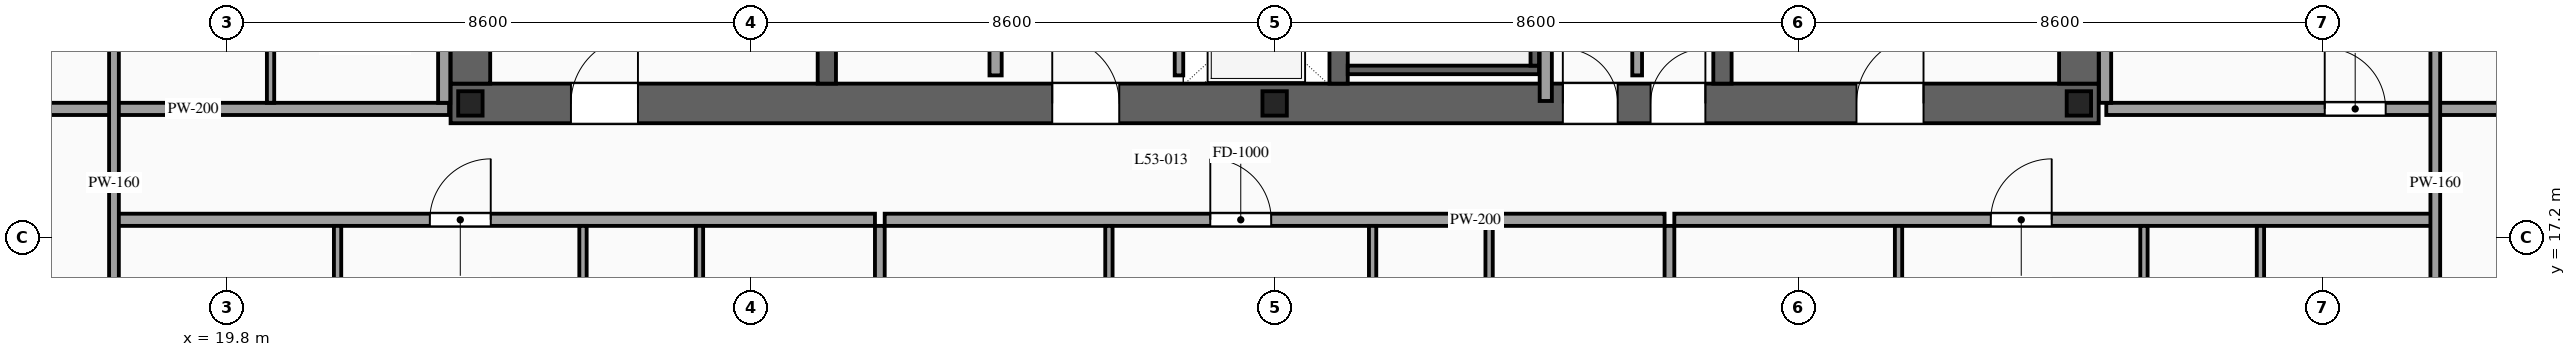
"""IFC4 building model, lengths in metres.
Left out: names, types, materials, properties, quantities, classifications, styles, units other than length and angle.
Written with IfcOpenShell. Run it as: python <this file> out.ifc"""

import sys

from ifc_helpers import new_model, si_unit, direction, frame, frame_2d, origin, origin_2d, place, context, subcontext, project, spatial, rectangle, i_section, extrude, source, transform, mapped, element, fill, save


model = new_model("IFC4")
c1 = context("Model", 3, precision=1e-05, world=origin(), true_north=direction((0.0, 1.0)))
c2 = subcontext(c1, "Body", "Model", "MODEL_VIEW")
j1 = project(units=[si_unit("LENGTHUNIT", "METRE"), si_unit("PLANEANGLEUNIT", "RADIAN")], contexts=[c1])
p1 = place(None, origin())
s1 = spatial("IfcSite", under=j1, at=p1, CompositionType="ELEMENT")
p2 = place(p1, origin())
s2 = spatial("IfcBuilding", under=s1, at=p2, CompositionType="ELEMENT")
p3 = place(p2, frame((0.0, 0.0, 202.0)))
s3 = spatial("IfcBuildingStorey", under=s2, at=p3, CompositionType="ELEMENT", Elevation=202.0)
p4 = place(p3, frame((23.475, 19.4, 0.0), z_axis=(0.0, 0.0, 1.0), x_axis=(1.0, 0.0, 0.0)))
e1 = element("IfcWall", 1, at=p4, inside=s3, PredefinedType="SHEAR", context=c2, shape_type="SweptSolid", body=[
    extrude(rectangle(XDim=27.05, YDim=0.65, at=frame_2d((13.525, 0.0))), origin(), (0.0, 0.0, 1.0), 3.5),
])
p5 = place(p4, frame((1.975, 0.0, 0.0)))
e2 = element("IfcOpeningElement", 2, at=p5, cuts=e1, PredefinedType="OPENING", context=c2, shape_type="SweptSolid", body=[
    extrude(rectangle(XDim=1.1, YDim=2.2, at=frame_2d((0.55, 1.1))), frame((0.0, 0.34, 0.0), z_axis=(0.0, -1.0, 0.0), x_axis=(1.0, 0.0, 0.0)), (0.0, 0.0, 1.0), 0.68),
])
p6 = place(p4, frame((9.875, 0.0, 0.0)))
e3 = element("IfcOpeningElement", 3, at=p6, cuts=e1, PredefinedType="OPENING", context=c2, shape_type="SweptSolid", body=[
    extrude(rectangle(XDim=1.1, YDim=2.2, at=frame_2d((0.55, 1.1))), frame((0.0, 0.34, 0.0), z_axis=(0.0, -1.0, 0.0), x_axis=(1.0, 0.0, 0.0)), (0.0, 0.0, 1.0), 0.68),
])
p7 = place(p4, frame((23.075, 0.0, 0.0)))
e4 = element("IfcOpeningElement", 4, at=p7, cuts=e1, PredefinedType="OPENING", context=c2, shape_type="SweptSolid", body=[
    extrude(rectangle(XDim=1.1, YDim=2.2, at=frame_2d((0.55, 1.1))), frame((0.0, 0.34, 0.0), z_axis=(0.0, -1.0, 0.0), x_axis=(1.0, 0.0, 0.0)), (0.0, 0.0, 1.0), 0.68),
])
p8 = place(p4, frame((19.695, 0.0, 0.0)))
e5 = element("IfcOpeningElement", 5, at=p8, cuts=e1, PredefinedType="OPENING", context=c2, shape_type="SweptSolid", body=[
    extrude(rectangle(XDim=0.9, YDim=2.15, at=frame_2d((0.45, 1.075))), frame((0.0, 0.34, 0.0), z_axis=(0.0, -1.0, 0.0), x_axis=(1.0, 0.0, 0.0)), (0.0, 0.0, 1.0), 0.68),
])
p9 = place(p4, frame((18.255, 0.0, 0.0)))
e6 = element("IfcOpeningElement", 6, at=p9, cuts=e1, PredefinedType="OPENING", context=c2, shape_type="SweptSolid", body=[
    extrude(rectangle(XDim=0.9, YDim=2.15, at=frame_2d((0.45, 1.075))), frame((0.0, 0.34, 0.0), z_axis=(0.0, -1.0, 0.0), x_axis=(1.0, 0.0, 0.0)), (0.0, 0.0, 1.0), 0.68),
])
m1 = source(origin(), c2, "Body", "SweptSolid", [
    extrude(rectangle(XDim=12.15, YDim=0.65, at=frame_2d((6.075, 0.0))), origin(), (0.0, 0.0, 1.0), 3.5),
])
for number, where, z_axis, x_axis in (
    (7, (23.8, 19.725, 0.0), (0.0, 0.0, 1.0), (0.0, 1.0, 0.0)),
    (8, (50.2, 19.725, 0.0), (0.0, 0.0, 1.0), (0.0, 1.0, 0.0)),
):
    element("IfcWall", number, at=place(p3, frame(where, z_axis=z_axis, x_axis=x_axis)), inside=s3, PredefinedType="SHEAR", context=c2, shape_type="MappedRepresentation", body=[
        mapped(m1, transform((0.0, 0.0, 0.0), scale=1.0)),
    ])
m2 = source(origin(), c2, "Body", "SweptSolid", [
    extrude(rectangle(XDim=12.15, YDim=0.3, at=frame_2d((6.075, 0.0))), origin(), (0.0, 0.0, 1.0), 3.5),
])
for number, where, z_axis, x_axis in (
    (9, (29.65, 19.725, 0.0), (0.0, 0.0, 1.0), (0.0, 1.0, 0.0)),
    (10, (38.05, 19.725, 0.0), (0.0, 0.0, 1.0), (0.0, 1.0, 0.0)),
    (11, (44.35, 19.725, 0.0), (0.0, 0.0, 1.0), (0.0, 1.0, 0.0)),
):
    element("IfcWall", number, at=place(p3, frame(where, z_axis=z_axis, x_axis=x_axis)), inside=s3, PredefinedType="SOLIDWALL", context=c2, shape_type="MappedRepresentation", body=[
        mapped(m2, transform((0.0, 0.0, 0.0), scale=1.0)),
    ])
m3 = source(origin(), c2, "Body", "SweptSolid", [
    extrude(i_section(OverallWidth=0.4, OverallDepth=0.4, WebThickness=0.013, FlangeThickness=0.021, at=origin_2d()), origin(), (0.0, 0.0, 1.0), 3.5),
])
for number, where, z_axis, x_axis in (
    (12, (23.8, 19.4, 0.0), (0.0, 0.0, 1.0), (1.0, 0.0, 0.0)),
    (13, (37.0, 19.4, 0.0), (0.0, 0.0, 1.0), (1.0, 0.0, 0.0)),
    (14, (50.2, 19.4, 0.0), (0.0, 0.0, 1.0), (1.0, 0.0, 0.0)),
):
    element("IfcColumn", number, at=place(p3, frame(where, z_axis=z_axis, x_axis=x_axis)), inside=s3, PredefinedType="COLUMN", context=c2, shape_type="MappedRepresentation", body=[
        mapped(m3, transform((0.0, 0.0, 0.0), scale=1.0)),
    ])
p10 = place(p3, frame((35.43, 19.86, 0.0), z_axis=(0.0, 0.0, 1.0), x_axis=(0.0, 1.0, 0.0)))
e15 = element("IfcWall", 15, at=p10, inside=s3, PredefinedType="SOLIDWALL", context=c2, shape_type="SweptSolid", body=[
    extrude(rectangle(XDim=2.04, YDim=0.14, at=frame_2d((1.02, 0.0))), origin(), (0.0, 0.0, 1.0), 3.28),
])
p11 = place(p10, frame((0.47, 0.0, 0.0)))
e16 = element("IfcOpeningElement", 16, at=p11, cuts=e15, PredefinedType="OPENING", context=c2, shape_type="SweptSolid", body=[
    extrude(rectangle(XDim=1.1, YDim=2.2, at=frame_2d((0.55, 1.1))), frame((0.0, 0.085, 0.0), z_axis=(0.0, -1.0, 0.0), x_axis=(1.0, 0.0, 0.0)), (0.0, 0.0, 1.0), 0.17),
])
m4 = source(origin(), c2, "Body", "SweptSolid", [
    extrude(rectangle(XDim=3.14, YDim=0.14, at=frame_2d((1.57, 0.0))), origin(), (0.0, 0.0, 1.0), 3.28),
])
p12 = place(p3, frame((38.2, 19.95, 0.0), z_axis=(0.0, 0.0, 1.0), x_axis=(1.0, 0.0, 0.0)))
e17 = element("IfcWall", 17, at=p12, inside=s3, PredefinedType="SOLIDWALL", context=c2, shape_type="MappedRepresentation", body=[
    mapped(m4, transform((0.0, 0.0, 0.0), scale=1.0)),
])
m5 = source(origin(), c2, "Body", "SweptSolid", [
    extrude(rectangle(XDim=8.94, YDim=0.14, at=frame_2d((4.47, 0.0))), origin(), (0.0, 0.0, 1.0), 3.28),
])
p13 = place(p3, frame((41.27, 20.02, 0.0), z_axis=(0.0, 0.0, 1.0), x_axis=(0.0, 1.0, 0.0)))
e18 = element("IfcWall", 18, at=p13, inside=s3, PredefinedType="SOLIDWALL", context=c2, shape_type="MappedRepresentation", body=[
    mapped(m5, transform((0.0, 0.0, 0.0), scale=1.0)),
])
p14 = place(p3, frame((32.42, 19.86, 0.0), z_axis=(0.0, 0.0, 1.0), x_axis=(0.0, 1.0, 0.0)))
e19 = element("IfcWall", 19, at=p14, inside=s3, PredefinedType="PARTITIONING", context=c2, shape_type="SweptSolid", body=[
    extrude(rectangle(XDim=11.88, YDim=0.2, at=frame_2d((5.94, 0.0))), origin(), (0.0, 0.0, 1.0), 3.28),
])
p15 = place(p14, frame((5.49, 0.0, 0.0)))
e20 = element("IfcOpeningElement", 20, at=p15, cuts=e19, PredefinedType="OPENING", context=c2, shape_type="SweptSolid", body=[
    extrude(rectangle(XDim=0.9, YDim=2.15, at=frame_2d((0.45, 1.075))), frame((0.0, 0.115, 0.0), z_axis=(0.0, -1.0, 0.0), x_axis=(1.0, 0.0, 0.0)), (0.0, 0.0, 1.0), 0.23),
])
m6 = source(origin(), c2, "Body", "SweptSolid", [
    extrude(rectangle(XDim=1.34, YDim=0.16, at=frame_2d((0.67, 0.0))), origin(), (0.0, 0.0, 1.0), 3.28),
])
p16 = place(p3, frame((42.95, 19.86, 0.0), z_axis=(0.0, 0.0, 1.0), x_axis=(0.0, 1.0, 0.0)))
e21 = element("IfcWall", 21, at=p16, inside=s3, PredefinedType="PARTITIONING", context=c2, shape_type="MappedRepresentation", body=[
    mapped(m6, transform((0.0, 0.0, 0.0), scale=1.0)),
])
m7 = source(origin(), c2, "Body", "SweptSolid", [
    extrude(rectangle(XDim=12.72, YDim=0.2, at=frame_2d((6.36, 0.0))), origin(), (0.0, 0.0, 1.0), 3.28),
])
p17 = place(p3, frame((41.45, 19.44, 0.0), z_axis=(0.0, 0.0, 1.0), x_axis=(0.0, 1.0, 0.0)))
e22 = element("IfcWall", 22, at=p17, inside=s3, PredefinedType="PARTITIONING", context=c2, shape_type="MappedRepresentation", body=[
    mapped(m7, transform((0.0, 0.0, 0.0), scale=1.0)),
])
p18 = place(p3, frame((17.94, 17.49, 0.0), z_axis=(0.0, 0.0, 1.0), x_axis=(1.0, 0.0, 0.0)))
e23 = element("IfcWall", 23, at=p18, inside=s3, PredefinedType="PARTITIONING", context=c2, shape_type="SweptSolid", body=[
    extrude(rectangle(XDim=12.5, YDim=0.2, at=frame_2d((6.25, 0.0))), origin(), (0.0, 0.0, 1.0), 3.28),
])
p19 = place(p18, frame((5.194, 0.0, 0.0)))
e24 = element("IfcOpeningElement", 24, at=p19, cuts=e23, PredefinedType="OPENING", context=c2, shape_type="SweptSolid", body=[
    extrude(rectangle(XDim=1.0, YDim=2.2, at=frame_2d((0.5, 1.1))), frame((0.0, 0.115, 0.0), z_axis=(0.0, -1.0, 0.0), x_axis=(1.0, 0.0, 0.0)), (0.0, 0.0, 1.0), 0.23),
])
m8 = source(origin(), c2, "Body", "SweptSolid", [
    extrude(rectangle(XDim=13.54, YDim=0.16, at=frame_2d((6.77, 0.0))), origin(), (0.0, 0.0, 1.0), 3.28),
])
p20 = place(p3, frame((30.52, 3.85, 0.0), z_axis=(0.0, 0.0, 1.0), x_axis=(0.0, 1.0, 0.0)))
e25 = element("IfcWall", 25, at=p20, inside=s3, PredefinedType="PARTITIONING", context=c2, shape_type="MappedRepresentation", body=[
    mapped(m8, transform((0.0, 0.0, 0.0), scale=1.0)),
])
m9 = source(origin(), c2, "Body", "SweptSolid", [
    extrude(rectangle(XDim=5.61, YDim=0.12, at=frame_2d((2.805, 0.0))), origin(), (0.0, 0.0, 1.0), 3.28),
])
p21 = place(p3, frame((21.62, 11.78, 0.0), z_axis=(0.0, 0.0, 1.0), x_axis=(0.0, 1.0, 0.0)))
e26 = element("IfcWall", 26, at=p21, inside=s3, PredefinedType="PARTITIONING", context=c2, shape_type="MappedRepresentation", body=[
    mapped(m9, transform((0.0, 0.0, 0.0), scale=1.0)),
])
p22 = place(p3, frame((27.56, 11.78, 0.0), z_axis=(0.0, 0.0, 1.0), x_axis=(0.0, 1.0, 0.0)))
e27 = element("IfcWall", 27, at=p22, inside=s3, PredefinedType="PARTITIONING", context=c2, shape_type="SweptSolid", body=[
    extrude(rectangle(XDim=5.61, YDim=0.12, at=frame_2d((2.805, 0.0))), origin(), (0.0, 0.0, 1.0), 3.28),
])
p23 = place(p22, frame((2.38, 0.0, 0.0)))
e28 = element("IfcOpeningElement", 28, at=p23, cuts=e27, PredefinedType="OPENING", context=c2, shape_type="SweptSolid", body=[
    extrude(rectangle(XDim=0.85, YDim=2.1, at=frame_2d((0.425, 1.05))), frame((0.0, 0.075, 0.0), z_axis=(0.0, -1.0, 0.0), x_axis=(1.0, 0.0, 0.0)), (0.0, 0.0, 1.0), 0.15),
])
p24 = place(p3, frame((25.648, 11.78, 0.0), z_axis=(0.0, 0.0, 1.0), x_axis=(0.0, 1.0, 0.0)))
e29 = element("IfcWall", 29, at=p24, inside=s3, PredefinedType="PARTITIONING", context=c2, shape_type="SweptSolid", body=[
    extrude(rectangle(XDim=5.61, YDim=0.12, at=frame_2d((2.805, 0.0))), origin(), (0.0, 0.0, 1.0), 3.28),
])
p25 = place(p24, frame((2.38, 0.0, 0.0)))
e30 = element("IfcOpeningElement", 30, at=p25, cuts=e29, PredefinedType="OPENING", context=c2, shape_type="SweptSolid", body=[
    extrude(rectangle(XDim=0.85, YDim=2.1, at=frame_2d((0.425, 1.05))), frame((0.0, 0.075, 0.0), z_axis=(0.0, -1.0, 0.0), x_axis=(1.0, 0.0, 0.0)), (0.0, 0.0, 1.0), 0.15),
])
p26 = place(p3, frame((30.6, 17.49, 0.0), z_axis=(0.0, 0.0, 1.0), x_axis=(1.0, 0.0, 0.0)))
e31 = element("IfcWall", 31, at=p26, inside=s3, PredefinedType="PARTITIONING", context=c2, shape_type="SweptSolid", body=[
    extrude(rectangle(XDim=12.8, YDim=0.2, at=frame_2d((6.4, 0.0))), origin(), (0.0, 0.0, 1.0), 3.28),
])
p27 = place(p26, frame((5.344, 0.0, 0.0)))
e32 = element("IfcOpeningElement", 32, at=p27, cuts=e31, PredefinedType="OPENING", context=c2, shape_type="SweptSolid", body=[
    extrude(rectangle(XDim=1.0, YDim=2.2, at=frame_2d((0.5, 1.1))), frame((0.0, 0.115, 0.0), z_axis=(0.0, -1.0, 0.0), x_axis=(1.0, 0.0, 0.0)), (0.0, 0.0, 1.0), 0.23),
])
p28 = place(p3, frame((43.48, 3.85, 0.0), z_axis=(0.0, 0.0, 1.0), x_axis=(0.0, 1.0, 0.0)))
e33 = element("IfcWall", 33, at=p28, inside=s3, PredefinedType="PARTITIONING", context=c2, shape_type="MappedRepresentation", body=[
    mapped(m8, transform((0.0, 0.0, 0.0), scale=1.0)),
])
p29 = place(p3, frame((34.28, 11.78, 0.0), z_axis=(0.0, 0.0, 1.0), x_axis=(0.0, 1.0, 0.0)))
e34 = element("IfcWall", 34, at=p29, inside=s3, PredefinedType="PARTITIONING", context=c2, shape_type="MappedRepresentation", body=[
    mapped(m9, transform((0.0, 0.0, 0.0), scale=1.0)),
])
p30 = place(p3, frame((40.52, 11.78, 0.0), z_axis=(0.0, 0.0, 1.0), x_axis=(0.0, 1.0, 0.0)))
e35 = element("IfcWall", 35, at=p30, inside=s3, PredefinedType="PARTITIONING", context=c2, shape_type="SweptSolid", body=[
    extrude(rectangle(XDim=5.61, YDim=0.12, at=frame_2d((2.805, 0.0))), origin(), (0.0, 0.0, 1.0), 3.28),
])
p31 = place(p30, frame((2.38, 0.0, 0.0)))
e36 = element("IfcOpeningElement", 36, at=p31, cuts=e35, PredefinedType="OPENING", context=c2, shape_type="SweptSolid", body=[
    extrude(rectangle(XDim=0.85, YDim=2.1, at=frame_2d((0.425, 1.05))), frame((0.0, 0.075, 0.0), z_axis=(0.0, -1.0, 0.0), x_axis=(1.0, 0.0, 0.0)), (0.0, 0.0, 1.0), 0.15),
])
p32 = place(p3, frame((38.608, 11.78, 0.0), z_axis=(0.0, 0.0, 1.0), x_axis=(0.0, 1.0, 0.0)))
e37 = element("IfcWall", 37, at=p32, inside=s3, PredefinedType="PARTITIONING", context=c2, shape_type="SweptSolid", body=[
    extrude(rectangle(XDim=5.61, YDim=0.12, at=frame_2d((2.805, 0.0))), origin(), (0.0, 0.0, 1.0), 3.28),
])
p33 = place(p32, frame((2.38, 0.0, 0.0)))
e38 = element("IfcOpeningElement", 38, at=p33, cuts=e37, PredefinedType="OPENING", context=c2, shape_type="SweptSolid", body=[
    extrude(rectangle(XDim=0.85, YDim=2.1, at=frame_2d((0.425, 1.05))), frame((0.0, 0.075, 0.0), z_axis=(0.0, -1.0, 0.0), x_axis=(1.0, 0.0, 0.0)), (0.0, 0.0, 1.0), 0.15),
])
p34 = place(p3, frame((43.56, 17.49, 0.0), z_axis=(0.0, 0.0, 1.0), x_axis=(1.0, 0.0, 0.0)))
e39 = element("IfcWall", 39, at=p34, inside=s3, PredefinedType="PARTITIONING", context=c2, shape_type="SweptSolid", body=[
    extrude(rectangle(XDim=12.5, YDim=0.2, at=frame_2d((6.25, 0.0))), origin(), (0.0, 0.0, 1.0), 3.28),
])
p35 = place(p34, frame((5.194, 0.0, 0.0)))
e40 = element("IfcOpeningElement", 40, at=p35, cuts=e39, PredefinedType="OPENING", context=c2, shape_type="SweptSolid", body=[
    extrude(rectangle(XDim=1.0, YDim=2.2, at=frame_2d((0.5, 1.1))), frame((0.0, 0.115, 0.0), z_axis=(0.0, -1.0, 0.0), x_axis=(1.0, 0.0, 0.0)), (0.0, 0.0, 1.0), 0.23),
])
p36 = place(p3, frame((47.24, 11.78, 0.0), z_axis=(0.0, 0.0, 1.0), x_axis=(0.0, 1.0, 0.0)))
e41 = element("IfcWall", 41, at=p36, inside=s3, PredefinedType="PARTITIONING", context=c2, shape_type="MappedRepresentation", body=[
    mapped(m9, transform((0.0, 0.0, 0.0), scale=1.0)),
])
p37 = place(p3, frame((53.18, 11.78, 0.0), z_axis=(0.0, 0.0, 1.0), x_axis=(0.0, 1.0, 0.0)))
e42 = element("IfcWall", 42, at=p37, inside=s3, PredefinedType="PARTITIONING", context=c2, shape_type="SweptSolid", body=[
    extrude(rectangle(XDim=5.61, YDim=0.12, at=frame_2d((2.805, 0.0))), origin(), (0.0, 0.0, 1.0), 3.28),
])
p38 = place(p37, frame((2.38, 0.0, 0.0)))
e43 = element("IfcOpeningElement", 43, at=p38, cuts=e42, PredefinedType="OPENING", context=c2, shape_type="SweptSolid", body=[
    extrude(rectangle(XDim=0.85, YDim=2.1, at=frame_2d((0.425, 1.05))), frame((0.0, 0.075, 0.0), z_axis=(0.0, -1.0, 0.0), x_axis=(1.0, 0.0, 0.0)), (0.0, 0.0, 1.0), 0.15),
])
p39 = place(p3, frame((51.268, 11.78, 0.0), z_axis=(0.0, 0.0, 1.0), x_axis=(0.0, 1.0, 0.0)))
e44 = element("IfcWall", 44, at=p39, inside=s3, PredefinedType="PARTITIONING", context=c2, shape_type="SweptSolid", body=[
    extrude(rectangle(XDim=5.61, YDim=0.12, at=frame_2d((2.805, 0.0))), origin(), (0.0, 0.0, 1.0), 3.28),
])
p40 = place(p39, frame((2.38, 0.0, 0.0)))
e45 = element("IfcOpeningElement", 45, at=p40, cuts=e44, PredefinedType="OPENING", context=c2, shape_type="SweptSolid", body=[
    extrude(rectangle(XDim=0.85, YDim=2.1, at=frame_2d((0.425, 1.05))), frame((0.0, 0.075, 0.0), z_axis=(0.0, -1.0, 0.0), x_axis=(1.0, 0.0, 0.0)), (0.0, 0.0, 1.0), 0.15),
])
m10 = source(origin(), c2, "Body", "SweptSolid", [
    extrude(rectangle(XDim=8.4, YDim=0.2, at=frame_2d((4.2, 0.0))), origin(), (0.0, 0.0, 1.0), 2.775),
])
p41 = place(p3, frame((15.05, 19.31, 0.0), z_axis=(0.0, 0.0, 1.0), x_axis=(1.0, 0.0, 0.0)))
e46 = element("IfcWall", 46, at=p41, inside=s3, PredefinedType="PARTITIONING", context=c2, shape_type="MappedRepresentation", body=[
    mapped(m10, transform((0.0, 0.0, 0.0), scale=1.0)),
])
m11 = source(origin(), c2, "Body", "SweptSolid", [
    extrude(rectangle(XDim=12.78, YDim=0.2, at=frame_2d((6.39, 0.0))), origin(), (0.0, 0.0, 1.0), 3.28),
])
p42 = place(p3, frame((23.37, 19.41, 0.0), z_axis=(0.0, 0.0, 1.0), x_axis=(0.0, 1.0, 0.0)))
e47 = element("IfcWall", 47, at=p42, inside=s3, PredefinedType="PARTITIONING", context=c2, shape_type="MappedRepresentation", body=[
    mapped(m11, transform((0.0, 0.0, 0.0), scale=1.0)),
])
p43 = place(p3, frame((20.52, 19.41, 0.0), z_axis=(0.0, 0.0, 1.0), x_axis=(0.0, 1.0, 0.0)))
e48 = element("IfcWall", 48, at=p43, inside=s3, PredefinedType="PARTITIONING", context=c2, shape_type="SweptSolid", body=[
    extrude(rectangle(XDim=5.623, YDim=0.12, at=frame_2d((2.812, 0.0))), origin(), (0.0, 0.0, 1.0), 3.28),
])
p44 = place(p43, frame((2.386, 0.0, 0.0)))
e49 = element("IfcOpeningElement", 49, at=p44, cuts=e48, PredefinedType="OPENING", context=c2, shape_type="SweptSolid", body=[
    extrude(rectangle(XDim=0.85, YDim=2.1, at=frame_2d((0.425, 1.05))), frame((0.0, 0.075, 0.0), z_axis=(0.0, -1.0, 0.0), x_axis=(1.0, 0.0, 0.0)), (0.0, 0.0, 1.0), 0.15),
])
p45 = place(p3, frame((50.65, 19.31, 0.0), z_axis=(0.0, 0.0, 1.0), x_axis=(1.0, 0.0, 0.0)))
e50 = element("IfcWall", 50, at=p45, inside=s3, PredefinedType="PARTITIONING", context=c2, shape_type="SweptSolid", body=[
    extrude(rectangle(XDim=8.3, YDim=0.2, at=frame_2d((4.15, 0.0))), origin(), (0.0, 0.0, 1.0), 2.775),
])
p46 = place(p45, frame((3.585, 0.0, 0.0)))
e51 = element("IfcOpeningElement", 51, at=p46, cuts=e50, PredefinedType="OPENING", context=c2, shape_type="SweptSolid", body=[
    extrude(rectangle(XDim=1.0, YDim=2.2, at=frame_2d((0.5, 1.1))), frame((0.0, 0.115, 0.0), z_axis=(0.0, -1.0, 0.0), x_axis=(1.0, 0.0, 0.0)), (0.0, 0.0, 1.0), 0.23),
])
m12 = source(origin(), c2, "Body", "SweptSolid", [
    extrude(rectangle(XDim=6.29, YDim=0.2, at=frame_2d((3.145, 0.0))), origin(), (0.0, 0.0, 1.0), 3.28),
])
p47 = place(p3, frame((50.63, 19.41, 0.0), z_axis=(0.0, 0.0, 1.0), x_axis=(0.0, 1.0, 0.0)))
e52 = element("IfcWall", 52, at=p47, inside=s3, PredefinedType="PARTITIONING", context=c2, shape_type="MappedRepresentation", body=[
    mapped(m12, transform((0.0, 0.0, 0.0), scale=1.0)),
])
m13 = source(origin(), c2, "Body", "SweptSolid", [
    extrude(rectangle(XDim=28.19, YDim=0.16, at=frame_2d((14.095, 0.0))), origin(), (0.0, 0.0, 1.0), 3.28),
])
for number, where, z_axis, x_axis in (
    (53, (17.95, 4.0, 0.0), (0.0, 0.0, 1.0), (0.0, 1.0, 0.0)),
    (54, (56.05, 4.0, 0.0), (0.0, 0.0, 1.0), (0.0, 1.0, 0.0)),
):
    element("IfcWall", number, at=place(p3, frame(where, z_axis=z_axis, x_axis=x_axis)), inside=s3, PredefinedType="PARTITIONING", context=c2, shape_type="MappedRepresentation", body=[
        mapped(m13, transform((0.0, 0.0, 0.0), scale=1.0)),
    ])
m14 = source(origin(), c2, "Body", "SweptSolid", [
    extrude(rectangle(XDim=1.1, YDim=2.2, at=frame_2d((0.55, 1.1))), frame((0.0, 0.025, 0.0), z_axis=(0.0, -1.0, 0.0), x_axis=(1.0, 0.0, 0.0)), (0.0, 0.0, 1.0), 0.05),
])
p48 = place(p5, origin())
e55 = element("IfcDoor", 55, at=p48, inside=s3, OperationType="SINGLE_SWING_RIGHT", PredefinedType="DOOR", context=c2, shape_type="MappedRepresentation", body=[
    mapped(m14, transform((0.0, 0.0, 0.0), scale=1.0)),
])
fill(e2, e55)
p49 = place(p6, origin())
e56 = element("IfcDoor", 56, at=p49, inside=s3, OperationType="SINGLE_SWING_LEFT", PredefinedType="DOOR", context=c2, shape_type="MappedRepresentation", body=[
    mapped(m14, transform((0.0, 0.0, 0.0), scale=1.0)),
])
fill(e3, e56)
p50 = place(p7, origin())
e57 = element("IfcDoor", 57, at=p50, inside=s3, OperationType="SINGLE_SWING_RIGHT", PredefinedType="DOOR", context=c2, shape_type="MappedRepresentation", body=[
    mapped(m14, transform((0.0, 0.0, 0.0), scale=1.0)),
])
fill(e4, e57)
m15 = source(origin(), c2, "Body", "SweptSolid", [
    extrude(rectangle(XDim=0.9, YDim=2.15, at=frame_2d((0.45, 1.075))), frame((0.0, 0.025, 0.0), z_axis=(0.0, -1.0, 0.0), x_axis=(1.0, 0.0, 0.0)), (0.0, 0.0, 1.0), 0.05),
])
p51 = place(p8, origin())
e58 = element("IfcDoor", 58, at=p51, inside=s3, OperationType="SINGLE_SWING_RIGHT", PredefinedType="DOOR", context=c2, shape_type="MappedRepresentation", body=[
    mapped(m15, transform((0.0, 0.0, 0.0), scale=1.0)),
])
fill(e5, e58)
p52 = place(p9, origin())
e59 = element("IfcDoor", 59, at=p52, inside=s3, OperationType="SINGLE_SWING_LEFT", PredefinedType="DOOR", context=c2, shape_type="MappedRepresentation", body=[
    mapped(m15, transform((0.0, 0.0, 0.0), scale=1.0)),
])
fill(e6, e59)
m16 = source(origin(), c2, "Body", "SweptSolid", [
    extrude(rectangle(XDim=1.0, YDim=2.2, at=frame_2d((0.5, 1.1))), frame((0.0, 0.025, 0.0), z_axis=(0.0, -1.0, 0.0), x_axis=(1.0, 0.0, 0.0)), (0.0, 0.0, 1.0), 0.05),
])
p53 = place(p19, origin())
e60 = element("IfcDoor", 60, at=p53, inside=s3, OperationType="SINGLE_SWING_RIGHT", PredefinedType="DOOR", context=c2, shape_type="MappedRepresentation", body=[
    mapped(m16, transform((0.0, 0.0, 0.0), scale=1.0)),
])
fill(e24, e60)
p54 = place(p27, origin())
e61 = element("IfcDoor", 61, at=p54, inside=s3, OperationType="SINGLE_SWING_LEFT", PredefinedType="DOOR", context=c2, shape_type="MappedRepresentation", body=[
    mapped(m16, transform((0.0, 0.0, 0.0), scale=1.0)),
])
fill(e32, e61)
p55 = place(p35, origin())
e62 = element("IfcDoor", 62, at=p55, inside=s3, OperationType="SINGLE_SWING_RIGHT", PredefinedType="DOOR", context=c2, shape_type="MappedRepresentation", body=[
    mapped(m16, transform((0.0, 0.0, 0.0), scale=1.0)),
])
fill(e40, e62)
p56 = place(p46, origin())
e63 = element("IfcDoor", 63, at=p56, inside=s3, OperationType="SINGLE_SWING_LEFT", PredefinedType="DOOR", context=c2, shape_type="MappedRepresentation", body=[
    mapped(m16, transform((0.0, 0.0, 0.0), scale=1.0)),
])
fill(e51, e63)
save(model, sys.argv[1])
